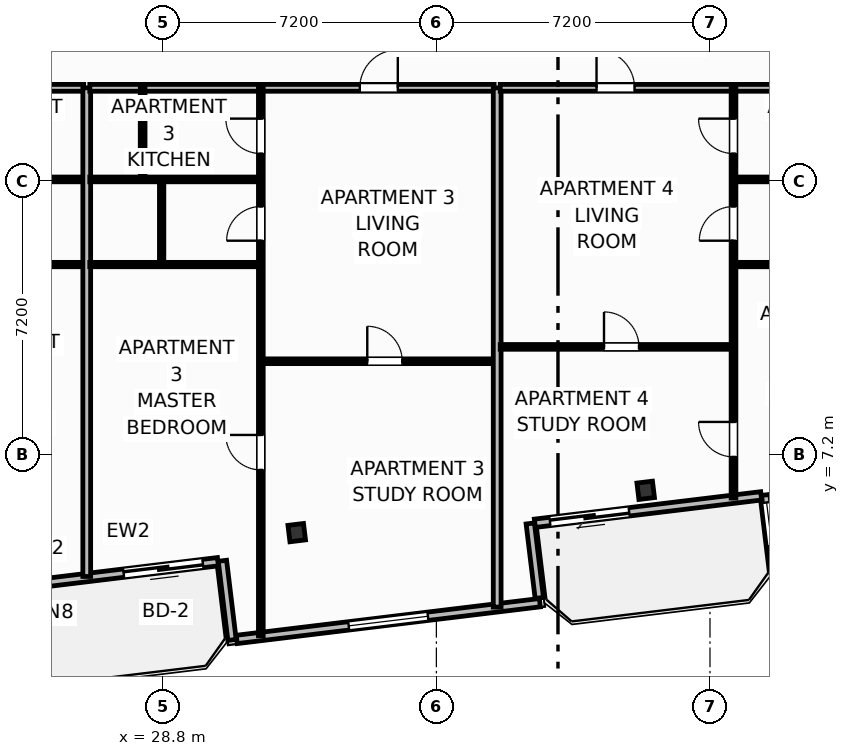
"""IFC4 building model, lengths in metres.
Left out: names, types, materials, properties, quantities, classifications, styles, units other than length and angle.
Written with IfcOpenShell. Run it as: python <this file> out.ifc"""

import sys

from ifc_helpers import new_model, si_unit, direction, frame, frame_2d, origin, origin_2d, place, context, subcontext, project, spatial, rectangle, i_section, extrude, element, fill, save


model = new_model("IFC4")
c1 = context("Model", 3, precision=1e-05, world=origin(), true_north=direction((0.0, 1.0)))
c2 = subcontext(c1, "Body", "Model", "MODEL_VIEW")
j1 = project(units=[si_unit("LENGTHUNIT", "METRE"), si_unit("PLANEANGLEUNIT", "RADIAN")], contexts=[c1])
p1 = place(None, origin())
s1 = spatial("IfcSite", under=j1, at=p1, CompositionType="ELEMENT")
p2 = place(p1, origin())
s2 = spatial("IfcBuilding", under=s1, at=p2, CompositionType="ELEMENT")
p3 = place(p2, frame((0.0, 0.0, 170.9)))
s3 = spatial("IfcBuildingStorey", under=s2, at=p3, CompositionType="ELEMENT", Elevation=170.9)
for number, where, z_axis, x_axis in (
    (1, (32.325, 5.146, 0.0), (0.0, 0.0, 1.0), (0.993, 0.12, 0.0)),
    (2, (41.508, 6.26, 0.0), (0.0, 0.0, 1.0), (0.993, 0.12, 0.0)),
):
    element("IfcColumn", number, at=place(p3, frame(where, z_axis=z_axis, x_axis=x_axis)), inside=s3, PredefinedType="COLUMN", context=c2, shape_type="SweptSolid", body=[
        extrude(i_section(OverallWidth=0.412, OverallDepth=0.435, WebThickness=0.036, FlangeThickness=0.057, FilletRadius=0.025, at=origin_2d()), origin(), (0.0, 0.0, 1.0), 3.7),
    ])
p4 = place(p3, frame((30.252, 4.381, 0.0), z_axis=(0.0, 0.0, 1.0), x_axis=(-0.992735402148, -0.120318000826, 0.0)))
e3 = element("IfcWall", 3, at=p4, inside=s3, PredefinedType="SOLIDWALL", context=c2, shape_type="SweptSolid", body=[
    extrude(rectangle(XDim=6.0, YDim=0.22, at=frame_2d((3.0, 0.0))), origin(), (0.0, 0.0, 1.0), 2.73),
])
p5 = place(p4, frame((0.4, 0.0, 0.0)))
e4 = element("IfcOpeningElement", 4, at=p5, cuts=e3, PredefinedType="OPENING", context=c2, shape_type="SweptSolid", body=[
    extrude(rectangle(XDim=2.1, YDim=2.3, at=frame_2d((1.05, 1.15))), frame((0.0, 0.12, 0.0), z_axis=(0.0, -1.0, 0.0), x_axis=(1.0, 0.0, 0.0)), (0.0, 0.0, 1.0), 0.24),
])
p6 = place(p3, frame((44.548, 6.114, 0.0), z_axis=(0.0, 0.0, 1.0), x_axis=(-0.992735402148, -0.120318000826, 0.0)))
e5 = element("IfcWall", 5, at=p6, inside=s3, PredefinedType="SOLIDWALL", context=c2, shape_type="SweptSolid", body=[
    extrude(rectangle(XDim=6.0, YDim=0.22, at=frame_2d((3.0, 0.0))), origin(), (0.0, 0.0, 1.0), 2.73),
])
p7 = place(p6, frame((3.5, 0.0, 0.0)))
e6 = element("IfcOpeningElement", 6, at=p7, cuts=e5, PredefinedType="OPENING", context=c2, shape_type="SweptSolid", body=[
    extrude(rectangle(XDim=2.1, YDim=2.3, at=frame_2d((1.05, 1.15))), frame((0.0, 0.12, 0.0), z_axis=(0.0, -1.0, 0.0), x_axis=(1.0, 0.0, 0.0)), (0.0, 0.0, 1.0), 0.24),
])
p8 = place(p3, frame((30.37, 4.406, 0.0), z_axis=(0.0, 0.0, 1.0), x_axis=(0.120327895535, -0.992734202874, 0.0)))
e7 = element("IfcWall", 7, at=p8, inside=s3, PredefinedType="SOLIDWALL", context=c2, shape_type="SweptSolid", body=[
    extrude(rectangle(XDim=2.1, YDim=0.22, at=frame_2d((1.05, 0.0))), origin(), (0.0, 0.0, 1.0), 2.73),
])
p9 = place(p3, frame((30.747, 2.336, 0.0), z_axis=(0.0, 0.0, 1.0), x_axis=(0.992731032022, 0.120354052946, 0.0)))
e8 = element("IfcWall", 8, at=p9, inside=s3, PredefinedType="SOLIDWALL", context=c2, shape_type="SweptSolid", body=[
    extrude(rectangle(XDim=8.035, YDim=0.22, at=frame_2d((4.018, 0.0))), origin(), (0.0, 0.0, 1.0), 2.73),
])
p10 = place(p9, frame((2.968, 0.0, 0.8)))
e9 = element("IfcOpeningElement", 9, at=p10, cuts=e8, PredefinedType="OPENING", context=c2, shape_type="SweptSolid", body=[
    extrude(rectangle(XDim=2.1, YDim=1.75, at=frame_2d((1.05, 0.875))), frame((0.0, 0.12, 0.0), z_axis=(0.0, -1.0, 0.0), x_axis=(1.0, 0.0, 0.0)), (0.0, 0.0, 1.0), 0.24),
])
p11 = place(p3, frame((38.709, 3.427, 0.0), z_axis=(0.0, 0.0, 1.0), x_axis=(-0.120397815541, 0.992725725472, 0.0)))
e10 = element("IfcWall", 10, at=p11, inside=s3, PredefinedType="SOLIDWALL", context=c2, shape_type="SweptSolid", body=[
    extrude(rectangle(XDim=1.975, YDim=0.22, at=frame_2d((0.988, 0.0))), origin(), (0.0, 0.0, 1.0), 2.73),
])
p12 = place(p3, frame((44.666, 6.138, 0.0), z_axis=(0.0, 0.0, 1.0), x_axis=(0.120327895535, -0.992734202874, 0.0)))
e11 = element("IfcWall", 11, at=p12, inside=s3, PredefinedType="SOLIDWALL", context=c2, shape_type="SweptSolid", body=[
    extrude(rectangle(XDim=2.1, YDim=0.22, at=frame_2d((1.05, 0.0))), origin(), (0.0, 0.0, 1.0), 2.73),
])
p13 = place(p12, frame((0.2, 0.0, 0.8)))
e12 = element("IfcOpeningElement", 12, at=p13, cuts=e11, PredefinedType="OPENING", context=c2, shape_type="SweptSolid", body=[
    extrude(rectangle(XDim=1.15, YDim=1.4, at=frame_2d((0.575, 0.7))), frame((0.0, 0.12, 0.0), z_axis=(0.0, -1.0, 0.0), x_axis=(1.0, 0.0, 0.0)), (0.0, 0.0, 1.0), 0.24),
])
p14 = place(p3, frame((16.08, 16.85, 0.0), z_axis=(0.0, 0.0, 1.0), x_axis=(1.0, 0.0, 0.0)))
e13 = element("IfcWall", 13, at=p14, inside=s3, PredefinedType="PARTITIONING", context=c2, shape_type="SweptSolid", body=[
    extrude(rectangle(XDim=10.64, YDim=0.18, at=frame_2d((5.32, 0.0))), origin(), (0.0, 0.0, 1.0), 3.45),
])
p15 = place(p14, frame((2.535, 0.0, 0.0)))
e14 = element("IfcOpeningElement", 14, at=p15, cuts=e13, PredefinedType="OPENING", context=c2, shape_type="SweptSolid", body=[
    extrude(rectangle(XDim=1.0, YDim=2.2, at=frame_2d((0.5, 1.1))), frame((0.0, 0.1, 0.0), z_axis=(0.0, -1.0, 0.0), x_axis=(1.0, 0.0, 0.0)), (0.0, 0.0, 1.0), 0.2),
])
p16 = place(p3, frame((22.289, 14.44, 0.0), z_axis=(0.0, 0.0, 1.0), x_axis=(1.0, 0.0, 0.0)))
e15 = element("IfcWall", 15, at=p16, inside=s3, PredefinedType="PARTITIONING", context=c2, shape_type="SweptSolid", body=[
    extrude(rectangle(XDim=4.431, YDim=0.125, at=frame_2d((2.215, 0.0))), origin(), (0.0, 0.0, 1.0), 3.45),
])
p17 = place(p3, frame((22.289, 12.2, 0.0), z_axis=(0.0, 0.0, 1.0), x_axis=(1.0, 0.0, 0.0)))
e16 = element("IfcWall", 16, at=p17, inside=s3, PredefinedType="PARTITIONING", context=c2, shape_type="SweptSolid", body=[
    extrude(rectangle(XDim=4.431, YDim=0.115, at=frame_2d((2.215, 0.0))), origin(), (0.0, 0.0, 1.0), 3.45),
])
p18 = place(p3, frame((26.8, 3.993, 0.0), z_axis=(0.0, 0.0, 1.0), x_axis=(0.0, 1.0, 0.0)))
e17 = element("IfcWall", 17, at=p18, inside=s3, PredefinedType="PARTITIONING", context=c2, shape_type="SweptSolid", body=[
    extrude(rectangle(XDim=12.857, YDim=0.205, at=frame_2d((6.429, 0.0))), origin(), (0.0, 0.0, 1.0), 3.45),
])
p19 = place(p3, frame((31.451, 9.656, 0.0), z_axis=(0.0, 0.0, 1.0), x_axis=(1.0, 0.0, 0.0)))
e18 = element("IfcWall", 18, at=p19, inside=s3, PredefinedType="PARTITIONING", context=c2, shape_type="SweptSolid", body=[
    extrude(rectangle(XDim=6.069, YDim=0.125, at=frame_2d((3.035, 0.0))), origin(), (0.0, 0.0, 1.0), 3.45),
])
p20 = place(p19, frame((2.731, 0.0, 0.0)))
e19 = element("IfcOpeningElement", 19, at=p20, cuts=e18, PredefinedType="OPENING", context=c2, shape_type="SweptSolid", body=[
    extrude(rectangle(XDim=0.92, YDim=2.05, at=frame_2d((0.46, 1.025))), frame((0.0, 0.073, 0.0), z_axis=(0.0, -1.0, 0.0), x_axis=(1.0, 0.0, 0.0)), (0.0, 0.0, 1.0), 0.145),
])
p21 = place(p3, frame((26.88, 16.85, 0.0), z_axis=(0.0, 0.0, 1.0), x_axis=(1.0, 0.0, 0.0)))
e20 = element("IfcWall", 20, at=p21, inside=s3, PredefinedType="PARTITIONING", context=c2, shape_type="SweptSolid", body=[
    extrude(rectangle(XDim=10.64, YDim=0.18, at=frame_2d((5.32, 0.0))), origin(), (0.0, 0.0, 1.0), 3.45),
])
p22 = place(p21, frame((7.105, 0.0, 0.0)))
e21 = element("IfcOpeningElement", 21, at=p22, cuts=e20, PredefinedType="OPENING", context=c2, shape_type="SweptSolid", body=[
    extrude(rectangle(XDim=1.0, YDim=2.2, at=frame_2d((0.5, 1.1))), frame((0.0, 0.1, 0.0), z_axis=(0.0, -1.0, 0.0), x_axis=(1.0, 0.0, 0.0)), (0.0, 0.0, 1.0), 0.2),
])
p23 = place(p3, frame((31.381, 2.433, 0.0), z_axis=(0.0, 0.0, 1.0), x_axis=(0.0, 1.0, 0.0)))
e22 = element("IfcWall", 22, at=p23, inside=s3, PredefinedType="PARTITIONING", context=c2, shape_type="SweptSolid", body=[
    extrude(rectangle(XDim=14.417, YDim=0.125, at=frame_2d((7.208, 0.0))), origin(), (0.0, 0.0, 1.0), 3.45),
])
p24 = place(p23, frame((4.364, 0.0, 0.0)))
e23 = element("IfcOpeningElement", 23, at=p24, cuts=e22, PredefinedType="OPENING", context=c2, shape_type="SweptSolid", body=[
    extrude(rectangle(XDim=0.92, YDim=2.05, at=frame_2d((0.46, 1.025))), frame((0.0, 0.073, 0.0), z_axis=(0.0, -1.0, 0.0), x_axis=(1.0, 0.0, 0.0)), (0.0, 0.0, 1.0), 0.145),
])
p25 = place(p23, frame((10.395, 0.0, 0.0)))
e24 = element("IfcOpeningElement", 24, at=p25, cuts=e22, PredefinedType="OPENING", context=c2, shape_type="SweptSolid", body=[
    extrude(rectangle(XDim=0.9, YDim=2.05, at=frame_2d((0.45, 1.025))), frame((0.0, 0.073, 0.0), z_axis=(0.0, -1.0, 0.0), x_axis=(1.0, 0.0, 0.0)), (0.0, 0.0, 1.0), 0.145),
])
p26 = place(p23, frame((12.687, 0.0, 0.0)))
e25 = element("IfcOpeningElement", 25, at=p26, cuts=e22, PredefinedType="OPENING", context=c2, shape_type="SweptSolid", body=[
    extrude(rectangle(XDim=0.92, YDim=2.05, at=frame_2d((0.46, 1.025))), frame((0.0, 0.073, 0.0), z_axis=(0.0, -1.0, 0.0), x_axis=(1.0, 0.0, 0.0)), (0.0, 0.0, 1.0), 0.145),
])
p27 = place(p3, frame((26.88, 14.44, 0.0), z_axis=(0.0, 0.0, 1.0), x_axis=(1.0, 0.0, 0.0)))
e26 = element("IfcWall", 26, at=p27, inside=s3, PredefinedType="PARTITIONING", context=c2, shape_type="SweptSolid", body=[
    extrude(rectangle(XDim=4.431, YDim=0.125, at=frame_2d((2.215, 0.0))), origin(), (0.0, 0.0, 1.0), 3.45),
])
p28 = place(p3, frame((26.88, 12.2, 0.0), z_axis=(0.0, 0.0, 1.0), x_axis=(1.0, 0.0, 0.0)))
e27 = element("IfcWall", 27, at=p28, inside=s3, PredefinedType="PARTITIONING", context=c2, shape_type="SweptSolid", body=[
    extrude(rectangle(XDim=4.431, YDim=0.115, at=frame_2d((2.215, 0.0))), origin(), (0.0, 0.0, 1.0), 3.45),
])
p29 = place(p3, frame((28.271, 14.44, 0.0), z_axis=(0.0, 0.0, 1.0), x_axis=(0.0, 1.0, 0.0)))
e28 = element("IfcWall", 28, at=p29, inside=s3, PredefinedType="PARTITIONING", context=c2, shape_type="SweptSolid", body=[
    extrude(rectangle(XDim=2.41, YDim=0.125, at=frame_2d((1.205, 0.0))), origin(), (0.0, 0.0, 1.0), 3.45),
])
p30 = place(p3, frame((28.771, 12.2, 0.0), z_axis=(0.0, 0.0, 1.0), x_axis=(0.0, 1.0, 0.0)))
e29 = element("IfcWall", 29, at=p30, inside=s3, PredefinedType="PARTITIONING", context=c2, shape_type="SweptSolid", body=[
    extrude(rectangle(XDim=2.24, YDim=0.115, at=frame_2d((1.12, 0.0))), origin(), (0.0, 0.0, 1.0), 3.45),
])
p31 = place(p3, frame((37.6, 3.187, 0.0), z_axis=(0.0, 0.0, 1.0), x_axis=(0.0, 1.0, 0.0)))
e30 = element("IfcWall", 30, at=p31, inside=s3, PredefinedType="PARTITIONING", context=c2, shape_type="SweptSolid", body=[
    extrude(rectangle(XDim=13.663, YDim=0.205, at=frame_2d((6.832, 0.0))), origin(), (0.0, 0.0, 1.0), 3.45),
])
p32 = place(p3, frame((37.68, 10.033, 0.0), z_axis=(0.0, 0.0, 1.0), x_axis=(1.0, 0.0, 0.0)))
e31 = element("IfcWall", 31, at=p32, inside=s3, PredefinedType="PARTITIONING", context=c2, shape_type="SweptSolid", body=[
    extrude(rectangle(XDim=6.069, YDim=0.125, at=frame_2d((3.035, 0.0))), origin(), (0.0, 0.0, 1.0), 3.45),
])
p33 = place(p32, frame((2.731, 0.0, 0.0)))
e32 = element("IfcOpeningElement", 32, at=p33, cuts=e31, PredefinedType="OPENING", context=c2, shape_type="SweptSolid", body=[
    extrude(rectangle(XDim=0.92, YDim=2.05, at=frame_2d((0.46, 1.025))), frame((0.0, 0.073, 0.0), z_axis=(0.0, -1.0, 0.0), x_axis=(1.0, 0.0, 0.0)), (0.0, 0.0, 1.0), 0.145),
])
p34 = place(p3, frame((37.68, 16.85, 0.0), z_axis=(0.0, 0.0, 1.0), x_axis=(1.0, 0.0, 0.0)))
e33 = element("IfcWall", 33, at=p34, inside=s3, PredefinedType="PARTITIONING", context=c2, shape_type="SweptSolid", body=[
    extrude(rectangle(XDim=10.64, YDim=0.18, at=frame_2d((5.32, 0.0))), origin(), (0.0, 0.0, 1.0), 3.45),
])
p35 = place(p34, frame((2.535, 0.0, 0.0)))
e34 = element("IfcOpeningElement", 34, at=p35, cuts=e33, PredefinedType="OPENING", context=c2, shape_type="SweptSolid", body=[
    extrude(rectangle(XDim=1.0, YDim=2.2, at=frame_2d((0.5, 1.1))), frame((0.0, 0.1, 0.0), z_axis=(0.0, -1.0, 0.0), x_axis=(1.0, 0.0, 0.0)), (0.0, 0.0, 1.0), 0.2),
])
p36 = place(p3, frame((43.819, 6.056, 0.0), z_axis=(0.0, 0.0, 1.0), x_axis=(0.0, 1.0, 0.0)))
e35 = element("IfcWall", 35, at=p36, inside=s3, PredefinedType="PARTITIONING", context=c2, shape_type="SweptSolid", body=[
    extrude(rectangle(XDim=10.794, YDim=0.125, at=frame_2d((5.397, 0.0))), origin(), (0.0, 0.0, 1.0), 2.662),
])
p37 = place(p36, frame((1.083, 0.0, 0.0)))
e36 = element("IfcOpeningElement", 36, at=p37, cuts=e35, PredefinedType="OPENING", context=c2, shape_type="SweptSolid", body=[
    extrude(rectangle(XDim=0.92, YDim=2.05, at=frame_2d((0.46, 1.025))), frame((0.0, 0.073, 0.0), z_axis=(0.0, -1.0, 0.0), x_axis=(1.0, 0.0, 0.0)), (0.0, 0.0, 1.0), 0.145),
])
p38 = place(p36, frame((6.771, 0.0, 0.0)))
e37 = element("IfcOpeningElement", 37, at=p38, cuts=e35, PredefinedType="OPENING", context=c2, shape_type="SweptSolid", body=[
    extrude(rectangle(XDim=0.9, YDim=2.05, at=frame_2d((0.45, 1.025))), frame((0.0, 0.073, 0.0), z_axis=(0.0, -1.0, 0.0), x_axis=(1.0, 0.0, 0.0)), (0.0, 0.0, 1.0), 0.145),
])
p39 = place(p36, frame((9.064, 0.0, 0.0)))
e38 = element("IfcOpeningElement", 38, at=p39, cuts=e35, PredefinedType="OPENING", context=c2, shape_type="SweptSolid", body=[
    extrude(rectangle(XDim=0.92, YDim=2.05, at=frame_2d((0.46, 1.025))), frame((0.0, 0.073, 0.0), z_axis=(0.0, -1.0, 0.0), x_axis=(1.0, 0.0, 0.0)), (0.0, 0.0, 1.0), 0.145),
])
p40 = place(p3, frame((43.889, 14.44, 0.0), z_axis=(0.0, 0.0, 1.0), x_axis=(1.0, 0.0, 0.0)))
e39 = element("IfcWall", 39, at=p40, inside=s3, PredefinedType="PARTITIONING", context=c2, shape_type="SweptSolid", body=[
    extrude(rectangle(XDim=4.431, YDim=0.125, at=frame_2d((2.215, 0.0))), origin(), (0.0, 0.0, 1.0), 3.45),
])
p41 = place(p3, frame((43.889, 12.2, 0.0), z_axis=(0.0, 0.0, 1.0), x_axis=(1.0, 0.0, 0.0)))
e40 = element("IfcWall", 40, at=p41, inside=s3, PredefinedType="PARTITIONING", context=c2, shape_type="SweptSolid", body=[
    extrude(rectangle(XDim=4.431, YDim=0.115, at=frame_2d((2.215, 0.0))), origin(), (0.0, 0.0, 1.0), 3.45),
])
p42 = place(p5, origin())
e41 = element("IfcDoor", 41, at=p42, inside=s3, OperationType="SLIDING_TO_LEFT", PredefinedType="DOOR", context=c2, shape_type="SweptSolid", body=[
    extrude(rectangle(XDim=2.1, YDim=2.3, at=frame_2d((1.05, 1.15))), frame((0.0, 0.025, 0.0), z_axis=(0.0, -1.0, 0.0), x_axis=(1.0, 0.0, 0.0)), (0.0, 0.0, 1.0), 0.05),
])
fill(e4, e41)
p43 = place(p7, origin())
e42 = element("IfcDoor", 42, at=p43, inside=s3, OperationType="SLIDING_TO_LEFT", PredefinedType="DOOR", context=c2, shape_type="SweptSolid", body=[
    extrude(rectangle(XDim=2.1, YDim=2.3, at=frame_2d((1.05, 1.15))), frame((0.0, 0.025, 0.0), z_axis=(0.0, -1.0, 0.0), x_axis=(1.0, 0.0, 0.0)), (0.0, 0.0, 1.0), 0.05),
])
fill(e6, e42)
p44 = place(p10, origin())
e43 = element("IfcWindow", 43, at=p44, inside=s3, PartitioningType="SINGLE_PANEL", PredefinedType="WINDOW", context=c2, shape_type="SweptSolid", body=[
    extrude(rectangle(XDim=2.1, YDim=1.75, at=frame_2d((1.05, 0.875))), frame((0.0, 0.03, 0.0), z_axis=(0.0, -1.0, 0.0), x_axis=(1.0, 0.0, 0.0)), (0.0, 0.0, 1.0), 0.06),
])
fill(e9, e43)
p45 = place(p20, origin())
e44 = element("IfcDoor", 44, at=p45, inside=s3, OperationType="SINGLE_SWING_LEFT", PredefinedType="DOOR", context=c2, shape_type="SweptSolid", body=[
    extrude(rectangle(XDim=0.92, YDim=2.05, at=frame_2d((0.46, 1.025))), frame((0.0, 0.025, 0.0), z_axis=(0.0, -1.0, 0.0), x_axis=(1.0, 0.0, 0.0)), (0.0, 0.0, 1.0), 0.05),
])
fill(e19, e44)
p46 = place(p22, origin())
e45 = element("IfcDoor", 45, at=p46, inside=s3, OperationType="SINGLE_SWING_RIGHT", PredefinedType="DOOR", context=c2, shape_type="SweptSolid", body=[
    extrude(rectangle(XDim=1.0, YDim=2.2, at=frame_2d((0.5, 1.1))), frame((0.0, 0.025, 0.0), z_axis=(0.0, -1.0, 0.0), x_axis=(1.0, 0.0, 0.0)), (0.0, 0.0, 1.0), 0.05),
])
fill(e21, e45)
p47 = place(p24, origin())
e46 = element("IfcDoor", 46, at=p47, inside=s3, OperationType="SINGLE_SWING_RIGHT", PredefinedType="DOOR", context=c2, shape_type="SweptSolid", body=[
    extrude(rectangle(XDim=0.92, YDim=2.05, at=frame_2d((0.46, 1.025))), frame((0.0, 0.025, 0.0), z_axis=(0.0, -1.0, 0.0), x_axis=(1.0, 0.0, 0.0)), (0.0, 0.0, 1.0), 0.05),
])
fill(e23, e46)
p48 = place(p25, origin())
e47 = element("IfcDoor", 47, at=p48, inside=s3, OperationType="SINGLE_SWING_LEFT", PredefinedType="DOOR", context=c2, shape_type="SweptSolid", body=[
    extrude(rectangle(XDim=0.9, YDim=2.05, at=frame_2d((0.45, 1.025))), frame((0.0, 0.025, 0.0), z_axis=(0.0, -1.0, 0.0), x_axis=(1.0, 0.0, 0.0)), (0.0, 0.0, 1.0), 0.05),
])
fill(e24, e47)
p49 = place(p26, origin())
e48 = element("IfcDoor", 48, at=p49, inside=s3, OperationType="SINGLE_SWING_RIGHT", PredefinedType="DOOR", context=c2, shape_type="SweptSolid", body=[
    extrude(rectangle(XDim=0.92, YDim=2.05, at=frame_2d((0.46, 1.025))), frame((0.0, 0.025, 0.0), z_axis=(0.0, -1.0, 0.0), x_axis=(1.0, 0.0, 0.0)), (0.0, 0.0, 1.0), 0.05),
])
fill(e25, e48)
p50 = place(p33, origin())
e49 = element("IfcDoor", 49, at=p50, inside=s3, OperationType="SINGLE_SWING_LEFT", PredefinedType="DOOR", context=c2, shape_type="SweptSolid", body=[
    extrude(rectangle(XDim=0.92, YDim=2.05, at=frame_2d((0.46, 1.025))), frame((0.0, 0.025, 0.0), z_axis=(0.0, -1.0, 0.0), x_axis=(1.0, 0.0, 0.0)), (0.0, 0.0, 1.0), 0.05),
])
fill(e32, e49)
p51 = place(p35, origin())
e50 = element("IfcDoor", 50, at=p51, inside=s3, OperationType="SINGLE_SWING_LEFT", PredefinedType="DOOR", context=c2, shape_type="SweptSolid", body=[
    extrude(rectangle(XDim=1.0, YDim=2.2, at=frame_2d((0.5, 1.1))), frame((0.0, 0.025, 0.0), z_axis=(0.0, -1.0, 0.0), x_axis=(1.0, 0.0, 0.0)), (0.0, 0.0, 1.0), 0.05),
])
fill(e34, e50)
p52 = place(p37, origin())
e51 = element("IfcDoor", 51, at=p52, inside=s3, OperationType="SINGLE_SWING_RIGHT", PredefinedType="DOOR", context=c2, shape_type="SweptSolid", body=[
    extrude(rectangle(XDim=0.92, YDim=2.05, at=frame_2d((0.46, 1.025))), frame((0.0, 0.025, 0.0), z_axis=(0.0, -1.0, 0.0), x_axis=(1.0, 0.0, 0.0)), (0.0, 0.0, 1.0), 0.05),
])
fill(e36, e51)
p53 = place(p38, origin())
e52 = element("IfcDoor", 52, at=p53, inside=s3, OperationType="SINGLE_SWING_LEFT", PredefinedType="DOOR", context=c2, shape_type="SweptSolid", body=[
    extrude(rectangle(XDim=0.9, YDim=2.05, at=frame_2d((0.45, 1.025))), frame((0.0, 0.025, 0.0), z_axis=(0.0, -1.0, 0.0), x_axis=(1.0, 0.0, 0.0)), (0.0, 0.0, 1.0), 0.05),
])
fill(e37, e52)
p54 = place(p39, origin())
e53 = element("IfcDoor", 53, at=p54, inside=s3, OperationType="SINGLE_SWING_RIGHT", PredefinedType="DOOR", context=c2, shape_type="SweptSolid", body=[
    extrude(rectangle(XDim=0.92, YDim=2.05, at=frame_2d((0.46, 1.025))), frame((0.0, 0.025, 0.0), z_axis=(0.0, -1.0, 0.0), x_axis=(1.0, 0.0, 0.0)), (0.0, 0.0, 1.0), 0.05),
])
fill(e38, e53)
p55 = place(p13, origin())
e54 = element("IfcWindow", 54, at=p55, inside=s3, PartitioningType="SINGLE_PANEL", PredefinedType="WINDOW", context=c2, shape_type="SweptSolid", body=[
    extrude(rectangle(XDim=1.15, YDim=1.4, at=frame_2d((0.575, 0.7))), frame((0.0, 0.03, 0.0), z_axis=(0.0, -1.0, 0.0), x_axis=(1.0, 0.0, 0.0)), (0.0, 0.0, 1.0), 0.06),
])
fill(e12, e54)
save(model, sys.argv[1])
